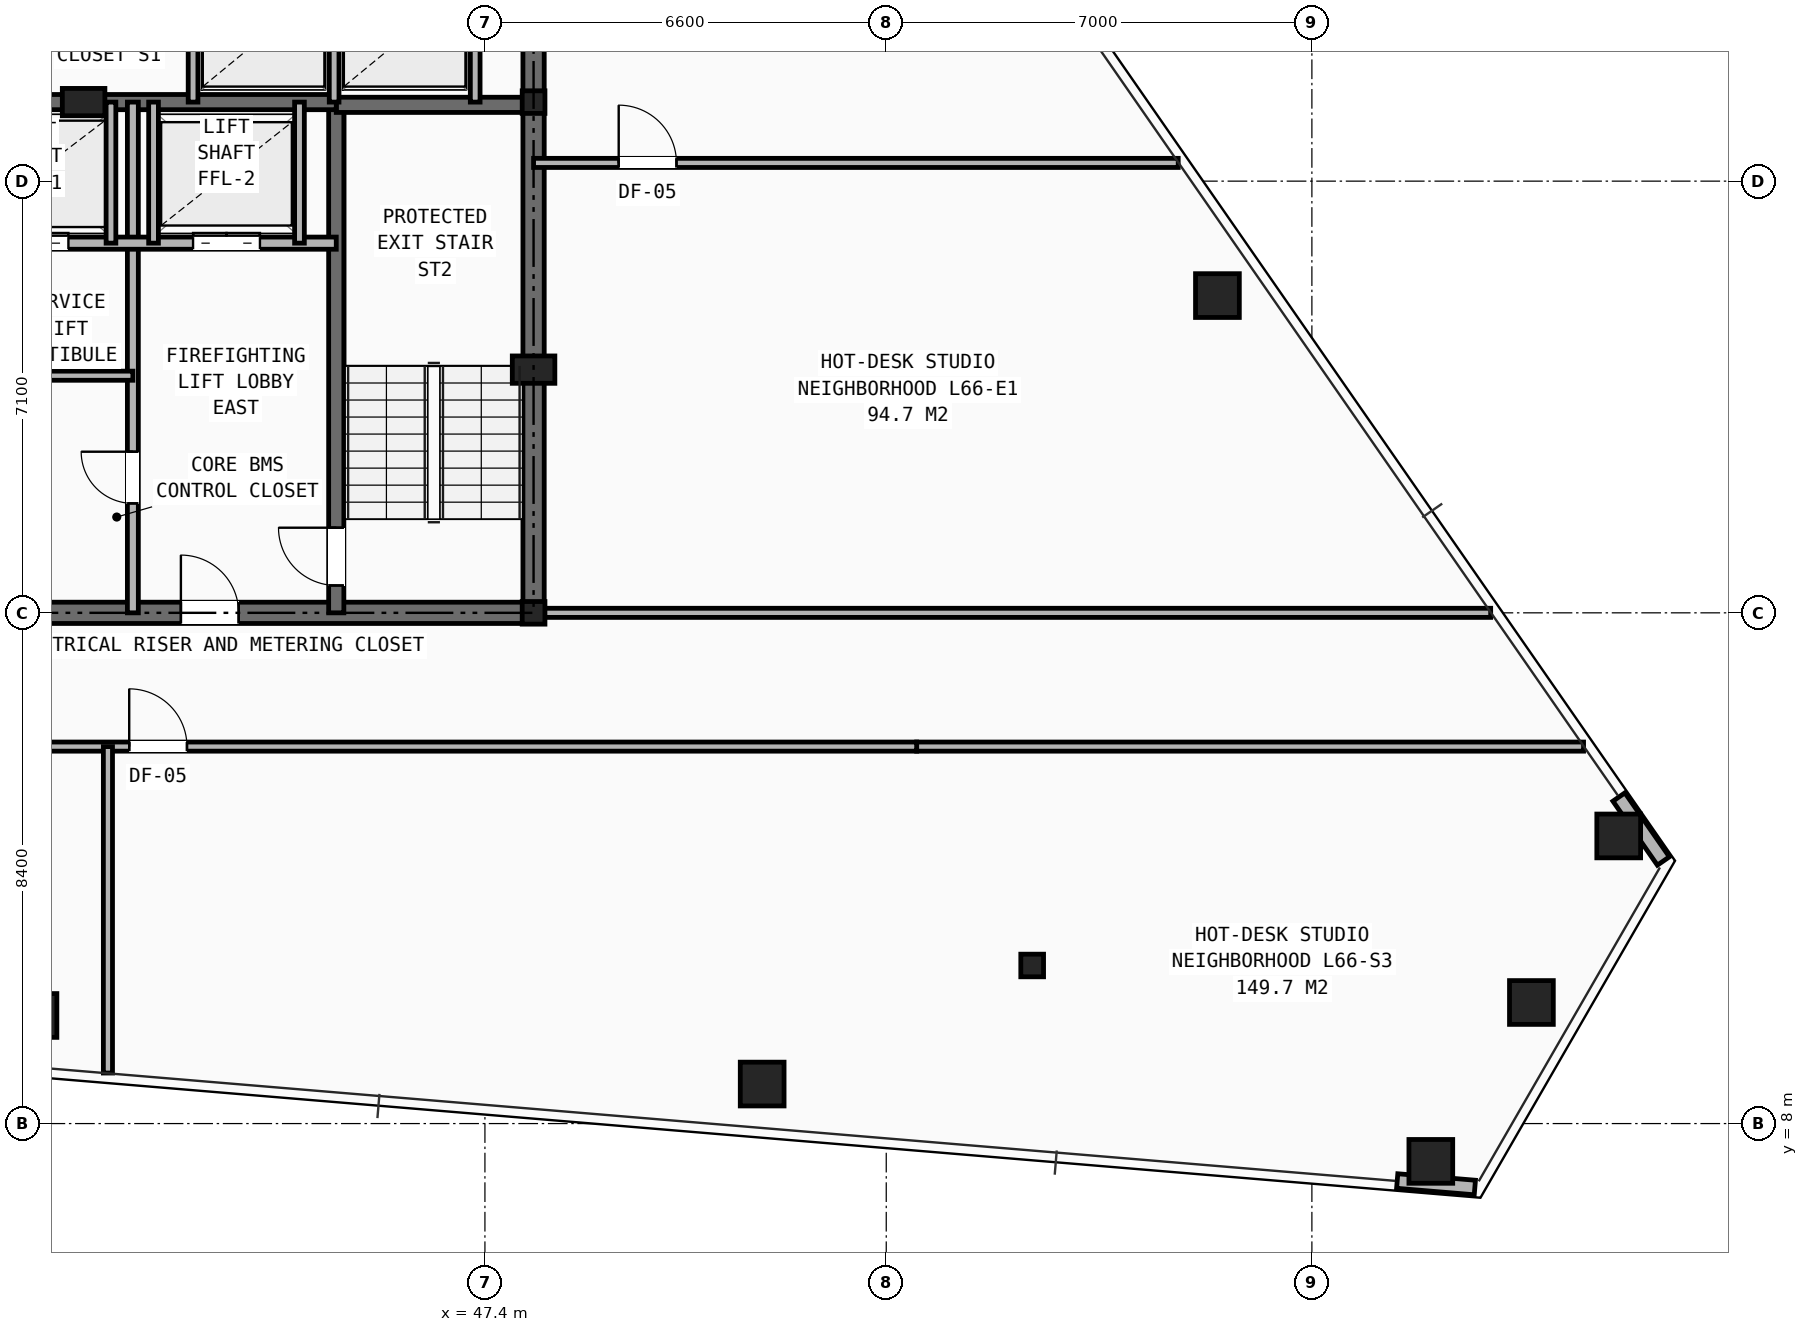
"""IFC4 building model, lengths in metres.
Left out: names, types, materials, properties, quantities, classifications, styles, units other than length and angle.
Written with IfcOpenShell. Run it as: python <this file> out.ifc"""

import sys

from ifc_helpers import new_model, si_unit, direction, frame, frame_2d, origin, origin_2d, place, context, subcontext, project, spatial, rectangle, hollow_rectangle, i_section, extrude, element, fill, save


model = new_model("IFC4")
c1 = context("Model", 3, precision=1e-05, world=origin(), true_north=direction((0.0, 1.0)))
c2 = subcontext(c1, "Body", "Model", "MODEL_VIEW")
j1 = project(units=[si_unit("LENGTHUNIT", "METRE"), si_unit("PLANEANGLEUNIT", "RADIAN")], contexts=[c1])
p1 = place(None, origin())
s1 = spatial("IfcSite", under=j1, at=p1, CompositionType="ELEMENT")
p2 = place(p1, origin())
s2 = spatial("IfcBuilding", under=s1, at=p2, CompositionType="ELEMENT")
p3 = place(p2, frame((0.0, 0.0, 232.9)))
s3 = spatial("IfcBuildingStorey", under=s2, at=p3, CompositionType="ELEMENT", Elevation=232.9)
for number, where, z_axis, x_axis in (
    (1, (48.2, 16.4, 0.0), (0.0, 0.0, 1.0), (1.0, 0.0, 0.0)),
    (2, (48.2, 24.8, 0.0), (0.0, 0.0, 1.0), (1.0, 0.0, 0.0)),
    (3, (56.4, 10.6, 0.0), (0.0, 0.0, 1.0), (1.0, 0.0, 0.0)),
):
    element("IfcColumn", number, at=place(p3, frame(where, z_axis=z_axis, x_axis=x_axis)), inside=s3, PredefinedType="COLUMN", context=c2, shape_type="SweptSolid", body=[
        extrude(i_section(OverallWidth=0.374, OverallDepth=0.372, WebThickness=0.016, FlangeThickness=0.026, at=origin_2d()), origin(), (0.0, 0.0, 1.0), 3.5),
    ])
for number, where, z_axis, x_axis in (
    (4, (48.2, 20.4, 0.0), (0.0, 0.0, 1.0), (1.0, 0.0, 0.0)),
    (5, (40.8, 24.8, 0.0), (0.0, 0.0, 1.0), (1.0, 0.0, 0.0)),
):
    element("IfcColumn", number, at=place(p3, frame(where, z_axis=z_axis, x_axis=x_axis)), inside=s3, PredefinedType="PILASTER", context=c2, shape_type="SweptSolid", body=[
        extrude(rectangle(XDim=0.7, YDim=0.45, at=origin_2d()), origin(), (0.0, 0.0, 1.0), 3.5),
    ])
for number, where, z_axis, x_axis in (
    (6, (40.0, 9.778, 0.0), (0.0, 0.0, 1.0), (1.0, 0.0, 0.0)),
    (7, (51.959, 8.65, 0.0), (0.0, 0.0, 1.0), (1.0, 0.0, 0.0)),
    (8, (62.956, 7.378, 0.0), (0.0, 0.0, 1.0), (1.0, 0.0, 0.0)),
    (9, (64.61, 9.991, 0.0), (0.0, 0.0, 1.0), (1.0, 0.0, 0.0)),
    (10, (66.046, 12.73, 0.0), (0.0, 0.0, 1.0), (1.0, 0.0, 0.0)),
    (11, (59.447, 21.618, 0.0), (0.0, 0.0, 1.0), (1.0, 0.0, 0.0)),
):
    element("IfcColumn", number, at=place(p3, frame(where, z_axis=z_axis, x_axis=x_axis)), inside=s3, PredefinedType="COLUMN", context=c2, shape_type="SweptSolid", body=[
        extrude(hollow_rectangle(XDim=0.72, YDim=0.72, WallThickness=0.05, at=origin_2d()), origin(), (0.0, 0.0, 1.0), 3.5),
    ])
p4 = place(p3, frame((62.403, 7.055, 0.0), z_axis=(0.0, 0.0, 1.0), x_axis=(0.996527336769, -0.083266242097, 0.0)))
e12 = element("IfcWall", 12, at=p4, inside=s3, PredefinedType="SHEAR", context=c2, shape_type="SweptSolid", body=[
    extrude(rectangle(XDim=1.281, YDim=0.24, at=frame_2d((0.641, 0.0))), origin(), (0.0, 0.0, 1.0), 2.623),
])
p5 = place(p3, frame((66.781, 12.318, 0.0), z_axis=(0.0, 0.0, 1.0), x_axis=(-0.5703386897, 0.821409629254, 0.0)))
e13 = element("IfcWall", 13, at=p5, inside=s3, PredefinedType="SHEAR", context=c2, shape_type="SweptSolid", body=[
    extrude(rectangle(XDim=1.282, YDim=0.24, at=frame_2d((0.641, 0.0))), origin(), (0.0, 0.0, 1.0), 2.623),
])
p6 = place(p3, frame((31.8, 16.4, 0.0), z_axis=(0.0, 0.0, 1.0), x_axis=(1.0, 0.0, 0.0)))
e14 = element("IfcWall", 14, at=p6, inside=s3, PredefinedType="SHEAR", context=c2, shape_type="SweptSolid", body=[
    extrude(rectangle(XDim=16.4, YDim=0.35, at=frame_2d((8.2, 0.0))), origin(), (0.0, 0.0, 1.0), 3.25),
])
p7 = place(p6, frame((4.2, 0.0, 0.0)))
e15 = element("IfcOpeningElement", 15, at=p7, cuts=e14, PredefinedType="OPENING", context=c2, shape_type="SweptSolid", body=[
    extrude(rectangle(XDim=0.95, YDim=2.1, at=frame_2d((0.475, 1.05))), frame((0.0, 0.185, 0.0), z_axis=(0.0, -1.0, 0.0), x_axis=(1.0, 0.0, 0.0)), (0.0, 0.0, 1.0), 0.37),
])
p8 = place(p6, frame((10.6, 0.0, 0.0)))
e16 = element("IfcOpeningElement", 16, at=p8, cuts=e14, PredefinedType="OPENING", context=c2, shape_type="SweptSolid", body=[
    extrude(rectangle(XDim=0.95, YDim=2.1, at=frame_2d((0.475, 1.05))), frame((0.0, 0.185, 0.0), z_axis=(0.0, -1.0, 0.0), x_axis=(1.0, 0.0, 0.0)), (0.0, 0.0, 1.0), 0.37),
])
p9 = place(p3, frame((48.2, 16.4, 0.0), z_axis=(0.0, 0.0, 1.0), x_axis=(0.0, 1.0, 0.0)))
e17 = element("IfcWall", 17, at=p9, inside=s3, PredefinedType="SHEAR", context=c2, shape_type="SweptSolid", body=[
    extrude(rectangle(XDim=14.8, YDim=0.35, at=frame_2d((7.4, 0.0))), origin(), (0.0, 0.0, 1.0), 3.25),
])
p10 = place(p9, frame((11.0, 0.0, 0.0)))
e18 = element("IfcOpeningElement", 18, at=p10, cuts=e17, PredefinedType="OPENING", context=c2, shape_type="SweptSolid", body=[
    extrude(rectangle(XDim=1.1, YDim=2.15, at=frame_2d((0.55, 1.075))), frame((0.0, 0.185, 0.0), z_axis=(0.0, -1.0, 0.0), x_axis=(1.0, 0.0, 0.0)), (0.0, 0.0, 1.0), 0.37),
])
p11 = place(p3, frame((44.955, 16.4, 0.0), z_axis=(0.0, 0.0, 1.0), x_axis=(0.0, 1.0, 0.0)))
e19 = element("IfcWall", 19, at=p11, inside=s3, PredefinedType="SHEAR", context=c2, shape_type="SweptSolid", body=[
    extrude(rectangle(XDim=8.4, YDim=0.25, at=frame_2d((4.2, 0.0))), origin(), (0.0, 0.0, 1.0), 3.25),
])
p12 = place(p11, frame((0.45, 0.0, 0.0)))
e20 = element("IfcOpeningElement", 20, at=p12, cuts=e19, PredefinedType="OPENING", context=c2, shape_type="SweptSolid", body=[
    extrude(rectangle(XDim=0.95, YDim=2.1, at=frame_2d((0.475, 1.05))), frame((0.0, 0.135, 0.0), z_axis=(0.0, -1.0, 0.0), x_axis=(1.0, 0.0, 0.0)), (0.0, 0.0, 1.0), 0.27),
])
p13 = place(p3, frame((44.955, 24.755, 0.0), z_axis=(0.0, 0.0, 1.0), x_axis=(1.0, 0.0, 0.0)))
e21 = element("IfcWall", 21, at=p13, inside=s3, PredefinedType="SHEAR", context=c2, shape_type="SweptSolid", body=[
    extrude(rectangle(XDim=3.245, YDim=0.25, at=frame_2d((1.623, 0.0))), origin(), (0.0, 0.0, 1.0), 3.25),
])
p14 = place(p3, frame((35.045, 24.8, 0.0), z_axis=(0.0, 0.0, 1.0), x_axis=(1.0, 0.0, 0.0)))
e22 = element("IfcWall", 22, at=p14, inside=s3, PredefinedType="SHEAR", context=c2, shape_type="SweptSolid", body=[
    extrude(rectangle(XDim=9.91, YDim=0.25, at=frame_2d((4.955, 0.0))), origin(), (0.0, 0.0, 1.0), 3.25),
])
p15 = place(p3, frame((41.61, 16.4, 0.0), z_axis=(0.0, 0.0, 1.0), x_axis=(0.0, 1.0, 0.0)))
e23 = element("IfcWall", 23, at=p15, inside=s3, PredefinedType="PARTITIONING", context=c2, shape_type="SweptSolid", body=[
    extrude(rectangle(XDim=8.4, YDim=0.18, at=frame_2d((4.2, 0.0))), origin(), (0.0, 0.0, 1.0), 2.705),
])
p16 = place(p15, frame((1.8, 0.0, 0.0)))
e24 = element("IfcOpeningElement", 24, at=p16, cuts=e23, PredefinedType="OPENING", context=c2, shape_type="SweptSolid", body=[
    extrude(rectangle(XDim=0.85, YDim=2.05, at=frame_2d((0.425, 1.025))), frame((0.0, 0.1, 0.0), z_axis=(0.0, -1.0, 0.0), x_axis=(1.0, 0.0, 0.0)), (0.0, 0.0, 1.0), 0.2),
])
p17 = place(p3, frame((35.045, 22.48, 0.0), z_axis=(0.0, 0.0, 1.0), x_axis=(1.0, 0.0, 0.0)))
e25 = element("IfcWall", 25, at=p17, inside=s3, PredefinedType="SOLIDWALL", context=c2, shape_type="SweptSolid", body=[
    extrude(rectangle(XDim=9.91, YDim=0.2, at=frame_2d((4.955, 0.0))), origin(), (0.0, 0.0, 1.0), 3.25),
])
p18 = place(p17, frame((1.255, 0.0, 0.0)))
e26 = element("IfcOpeningElement", 26, at=p18, cuts=e25, PredefinedType="OPENING", context=c2, shape_type="SweptSolid", body=[
    extrude(rectangle(XDim=1.1, YDim=2.15, at=frame_2d((0.55, 1.075))), frame((0.0, 0.11, 0.0), z_axis=(0.0, -1.0, 0.0), x_axis=(1.0, 0.0, 0.0)), (0.0, 0.0, 1.0), 0.22),
])
p19 = place(p17, frame((7.555, 0.0, 0.0)))
e27 = element("IfcOpeningElement", 27, at=p19, cuts=e25, PredefinedType="OPENING", context=c2, shape_type="SweptSolid", body=[
    extrude(rectangle(XDim=1.1, YDim=2.15, at=frame_2d((0.55, 1.075))), frame((0.0, 0.11, 0.0), z_axis=(0.0, -1.0, 0.0), x_axis=(1.0, 0.0, 0.0)), (0.0, 0.0, 1.0), 0.22),
])
p20 = place(p17, frame((4.405, 0.0, 0.0)))
e28 = element("IfcOpeningElement", 28, at=p20, cuts=e25, PredefinedType="OPENING", context=c2, shape_type="SweptSolid", body=[
    extrude(rectangle(XDim=1.1, YDim=2.15, at=frame_2d((0.55, 1.075))), frame((0.0, 0.11, 0.0), z_axis=(0.0, -1.0, 0.0), x_axis=(1.0, 0.0, 0.0)), (0.0, 0.0, 1.0), 0.22),
])
p21 = place(p3, frame((38.39, 20.3, 0.0), z_axis=(0.0, 0.0, 1.0), x_axis=(1.0, 0.0, 0.0)))
e29 = element("IfcWall", 29, at=p21, inside=s3, PredefinedType="PARTITIONING", context=c2, shape_type="SweptSolid", body=[
    extrude(rectangle(XDim=3.22, YDim=0.15, at=frame_2d((1.61, 0.0))), origin(), (0.0, 0.0, 1.0), 3.25),
])
for number, where, z_axis, x_axis in (
    (30, (41.95, 22.48, 0.0), (0.0, 0.0, 1.0), (0.0, 1.0, 0.0)),
    (31, (44.35, 22.48, 0.0), (0.0, 0.0, 1.0), (0.0, 1.0, 0.0)),
    (32, (41.25, 22.48, 0.0), (0.0, 0.0, 1.0), (0.0, 1.0, 0.0)),
):
    element("IfcWall", number, at=place(p3, frame(where, z_axis=z_axis, x_axis=x_axis)), inside=s3, PredefinedType="SOLIDWALL", context=c2, shape_type="SweptSolid", body=[
        extrude(rectangle(XDim=2.32, YDim=0.16, at=frame_2d((1.16, 0.0))), origin(), (0.0, 0.0, 1.0), 3.25),
    ])
for number, where, z_axis, x_axis in (
    (33, (42.6, 24.8, 0.0), (0.0, 0.0, 1.0), (0.0, 1.0, 0.0)),
    (34, (44.92, 24.8, 0.0), (0.0, 0.0, 1.0), (0.0, 1.0, 0.0)),
    (35, (47.24, 24.8, 0.0), (0.0, 0.0, 1.0), (0.0, 1.0, 0.0)),
):
    element("IfcWall", number, at=place(p3, frame(where, z_axis=z_axis, x_axis=x_axis)), inside=s3, PredefinedType="SOLIDWALL", context=c2, shape_type="SweptSolid", body=[
        extrude(rectangle(XDim=2.08, YDim=0.16, at=frame_2d((1.04, 0.0))), origin(), (0.0, 0.0, 1.0), 3.25),
    ])
p22 = place(p3, frame((54.5, 14.2, 0.0), z_axis=(0.0, 0.0, 1.0), x_axis=(1.0, 0.0, 0.0)))
e36 = element("IfcWall", 36, at=p22, inside=s3, PredefinedType="PARTITIONING", context=c2, shape_type="SweptSolid", body=[
    extrude(rectangle(XDim=10.968, YDim=0.15, at=frame_2d((5.484, 0.0))), origin(), (0.0, 0.0, 1.0), 2.265),
])
p23 = place(p3, frame((48.2, 16.4, 0.0), z_axis=(0.0, 0.0, 1.0), x_axis=(1.0, 0.0, 0.0)))
e37 = element("IfcWall", 37, at=p23, inside=s3, PredefinedType="PARTITIONING", context=c2, shape_type="SweptSolid", body=[
    extrude(rectangle(XDim=15.74, YDim=0.15, at=frame_2d((7.87, 0.0))), origin(), (0.0, 0.0, 1.0), 2.265),
])
p24 = place(p3, frame((25.5, 14.2, 0.0), z_axis=(0.0, 0.0, 1.0), x_axis=(1.0, 0.0, 0.0)))
e38 = element("IfcWall", 38, at=p24, inside=s3, PredefinedType="PARTITIONING", context=c2, shape_type="SweptSolid", body=[
    extrude(rectangle(XDim=29.0, YDim=0.15, at=frame_2d((14.5, 0.0))), origin(), (0.0, 0.0, 1.0), 2.265),
])
p25 = place(p24, frame((0.85, 0.0, 0.0)))
e39 = element("IfcOpeningElement", 39, at=p25, cuts=e38, PredefinedType="OPENING", context=c2, shape_type="SweptSolid", body=[
    extrude(rectangle(XDim=0.95, YDim=2.1, at=frame_2d((0.475, 1.05))), frame((0.0, 0.085, 0.0), z_axis=(0.0, -1.0, 0.0), x_axis=(1.0, 0.0, 0.0)), (0.0, 0.0, 1.0), 0.17),
])
p26 = place(p24, frame((9.35, 0.0, 0.0)))
e40 = element("IfcOpeningElement", 40, at=p26, cuts=e38, PredefinedType="OPENING", context=c2, shape_type="SweptSolid", body=[
    extrude(rectangle(XDim=0.95, YDim=2.1, at=frame_2d((0.475, 1.05))), frame((0.0, 0.085, 0.0), z_axis=(0.0, -1.0, 0.0), x_axis=(1.0, 0.0, 0.0)), (0.0, 0.0, 1.0), 0.17),
])
p27 = place(p24, frame((16.05, 0.0, 0.0)))
e41 = element("IfcOpeningElement", 41, at=p27, cuts=e38, PredefinedType="OPENING", context=c2, shape_type="SweptSolid", body=[
    extrude(rectangle(XDim=0.95, YDim=2.1, at=frame_2d((0.475, 1.05))), frame((0.0, 0.085, 0.0), z_axis=(0.0, -1.0, 0.0), x_axis=(1.0, 0.0, 0.0)), (0.0, 0.0, 1.0), 0.17),
])
p28 = place(p3, frame((41.2, 8.831, 0.0), z_axis=(0.0, 0.0, 1.0), x_axis=(0.0, 1.0, 0.0)))
e42 = element("IfcWall", 42, at=p28, inside=s3, PredefinedType="PARTITIONING", context=c2, shape_type="SweptSolid", body=[
    extrude(rectangle(XDim=5.369, YDim=0.15, at=frame_2d((2.684, 0.0))), origin(), (0.0, 0.0, 1.0), 2.628),
])
p29 = place(p3, frame((48.2, 23.8, 0.0), z_axis=(0.0, 0.0, 1.0), x_axis=(1.0, 0.0, 0.0)))
e43 = element("IfcWall", 43, at=p29, inside=s3, PredefinedType="PARTITIONING", context=c2, shape_type="SweptSolid", body=[
    extrude(rectangle(XDim=10.602, YDim=0.15, at=frame_2d((5.301, 0.0))), origin(), (0.0, 0.0, 1.0), 2.628),
])
p30 = place(p29, frame((1.4, 0.0, 0.0)))
e44 = element("IfcOpeningElement", 44, at=p30, cuts=e43, PredefinedType="OPENING", context=c2, shape_type="SweptSolid", body=[
    extrude(rectangle(XDim=0.95, YDim=2.1, at=frame_2d((0.475, 1.05))), frame((0.0, 0.085, 0.0), z_axis=(0.0, -1.0, 0.0), x_axis=(1.0, 0.0, 0.0)), (0.0, 0.0, 1.0), 0.17),
])
p31 = place(p16, origin())
e45 = element("IfcDoor", 45, at=p31, inside=s3, OperationType="SINGLE_SWING_RIGHT", PredefinedType="DOOR", context=c2, shape_type="SweptSolid", body=[
    extrude(rectangle(XDim=0.85, YDim=2.05, at=frame_2d((0.425, 1.025))), frame((0.0, 0.025, 0.0), z_axis=(0.0, -1.0, 0.0), x_axis=(1.0, 0.0, 0.0)), (0.0, 0.0, 1.0), 0.05),
])
fill(e24, e45)
p32 = place(p12, origin())
e46 = element("IfcDoor", 46, at=p32, inside=s3, OperationType="SINGLE_SWING_RIGHT", PredefinedType="DOOR", context=c2, shape_type="SweptSolid", body=[
    extrude(rectangle(XDim=0.95, YDim=2.1, at=frame_2d((0.475, 1.05))), frame((0.0, 0.025, 0.0), z_axis=(0.0, -1.0, 0.0), x_axis=(1.0, 0.0, 0.0)), (0.0, 0.0, 1.0), 0.05),
])
fill(e20, e46)
p33 = place(p8, origin())
e47 = element("IfcDoor", 47, at=p33, inside=s3, OperationType="SINGLE_SWING_LEFT", PredefinedType="DOOR", context=c2, shape_type="SweptSolid", body=[
    extrude(rectangle(XDim=0.95, YDim=2.1, at=frame_2d((0.475, 1.05))), frame((0.0, 0.025, 0.0), z_axis=(0.0, -1.0, 0.0), x_axis=(1.0, 0.0, 0.0)), (0.0, 0.0, 1.0), 0.05),
])
fill(e16, e47)
p34 = place(p19, origin())
e48 = element("IfcDoor", 48, at=p34, inside=s3, OperationType="DOUBLE_DOOR_SLIDING", PredefinedType="DOOR", context=c2, shape_type="SweptSolid", body=[
    extrude(rectangle(XDim=1.1, YDim=2.15, at=frame_2d((0.55, 1.075))), frame((0.0, 0.025, 0.0), z_axis=(0.0, -1.0, 0.0), x_axis=(1.0, 0.0, 0.0)), (0.0, 0.0, 1.0), 0.05),
])
fill(e27, e48)
p35 = place(p20, origin())
e49 = element("IfcDoor", 49, at=p35, inside=s3, OperationType="DOUBLE_DOOR_SLIDING", PredefinedType="DOOR", context=c2, shape_type="SweptSolid", body=[
    extrude(rectangle(XDim=1.1, YDim=2.15, at=frame_2d((0.55, 1.075))), frame((0.0, 0.025, 0.0), z_axis=(0.0, -1.0, 0.0), x_axis=(1.0, 0.0, 0.0)), (0.0, 0.0, 1.0), 0.05),
])
fill(e28, e49)
p36 = place(p27, origin())
e50 = element("IfcDoor", 50, at=p36, inside=s3, OperationType="SINGLE_SWING_LEFT", PredefinedType="DOOR", context=c2, shape_type="SweptSolid", body=[
    extrude(rectangle(XDim=0.95, YDim=2.1, at=frame_2d((0.475, 1.05))), frame((0.0, 0.025, 0.0), z_axis=(0.0, -1.0, 0.0), x_axis=(1.0, 0.0, 0.0)), (0.0, 0.0, 1.0), 0.05),
])
fill(e41, e50)
p37 = place(p30, origin())
e51 = element("IfcDoor", 51, at=p37, inside=s3, OperationType="SINGLE_SWING_LEFT", PredefinedType="DOOR", context=c2, shape_type="SweptSolid", body=[
    extrude(rectangle(XDim=0.95, YDim=2.1, at=frame_2d((0.475, 1.05))), frame((0.0, 0.025, 0.0), z_axis=(0.0, -1.0, 0.0), x_axis=(1.0, 0.0, 0.0)), (0.0, 0.0, 1.0), 0.05),
])
fill(e44, e51)
save(model, sys.argv[1])
